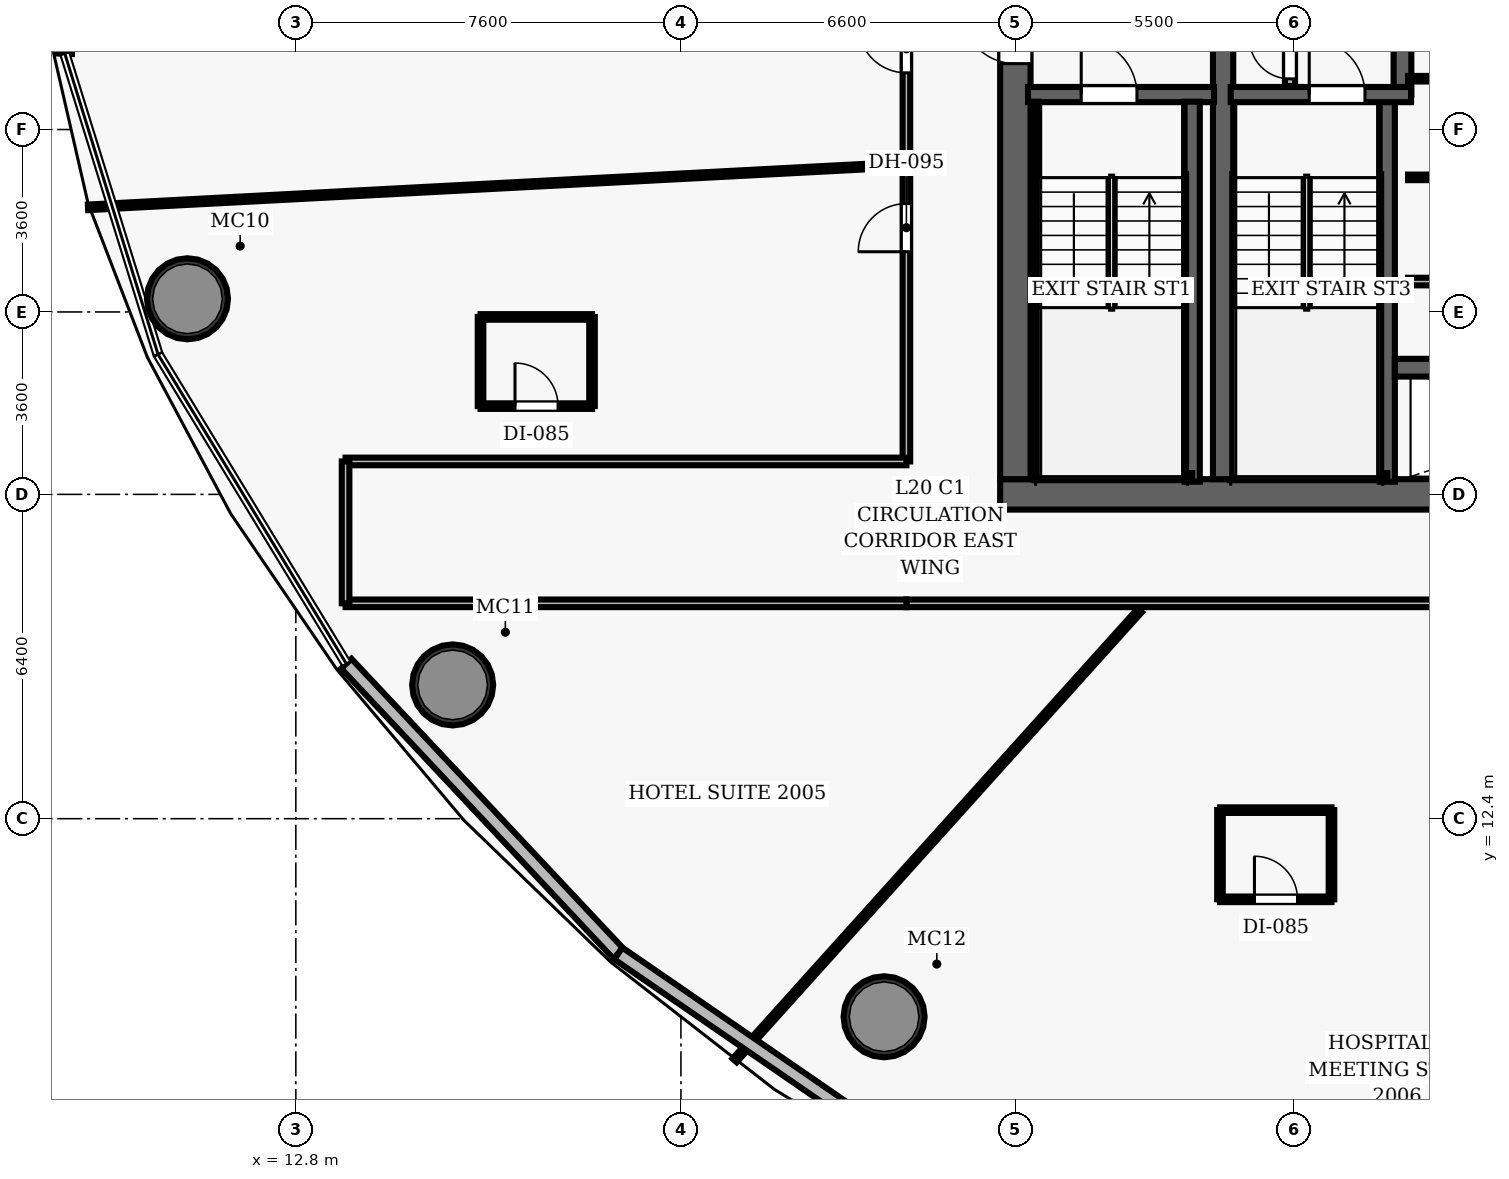
"""IFC4 building model, lengths in metres.
Left out: names, types, materials, properties, quantities, classifications, styles, units other than length and angle.
Written with IfcOpenShell. Run it as: python <this file> out.ifc"""

import sys

from ifc_helpers import new_model, si_unit, direction, frame, frame_2d, origin, origin_2d, place, context, subcontext, project, spatial, rectangle, hollow_circle, extrude, element, fill, save


model = new_model("IFC4")
c1 = context("Model", 3, precision=1e-05, world=origin(), true_north=direction((0.0, 1.0)))
c2 = subcontext(c1, "Body", "Model", "MODEL_VIEW")
j1 = project(units=[si_unit("LENGTHUNIT", "METRE"), si_unit("PLANEANGLEUNIT", "RADIAN")], contexts=[c1])
p1 = place(None, origin())
s1 = spatial("IfcSite", under=j1, at=p1, CompositionType="ELEMENT")
p2 = place(p1, origin())
s2 = spatial("IfcBuilding", under=s1, at=p2, CompositionType="ELEMENT")
p3 = place(p2, frame((0.0, 0.0, 86.9)))
s3 = spatial("IfcBuildingStorey", under=s2, at=p3, CompositionType="ELEMENT", Elevation=86.9)
p4 = place(p3, frame((26.7, 18.8, 0.0), z_axis=(0.0, 0.0, 1.0), x_axis=(1.0, 0.0, 0.0)))
e1 = element("IfcWall", 1, at=p4, inside=s3, PredefinedType="SHEAR", context=c2, shape_type="SweptSolid", body=[
    extrude(rectangle(XDim=22.6, YDim=0.6, at=frame_2d((11.3, 0.0))), origin(), (0.0, 0.0, 1.0), 3.5),
])
p5 = place(p4, frame((14.52, 0.0, 0.0)))
e2 = element("IfcOpeningElement", 2, at=p5, cuts=e1, PredefinedType="OPENING", context=c2, shape_type="SweptSolid", body=[
    extrude(rectangle(XDim=1.05, YDim=2.15, at=frame_2d((0.525, 1.075))), frame((0.0, 0.31, 0.0), z_axis=(0.0, -1.0, 0.0), x_axis=(1.0, 0.0, 0.0)), (0.0, 0.0, 1.0), 0.62),
])
p6 = place(p3, frame((27.0, 19.1, 0.0), z_axis=(0.0, 0.0, 1.0), x_axis=(0.0, 1.0, 0.0)))
e3 = element("IfcWall", 3, at=p6, inside=s3, PredefinedType="SHEAR", context=c2, shape_type="SweptSolid", body=[
    extrude(rectangle(XDim=13.8, YDim=0.6, at=frame_2d((6.9, 0.0))), origin(), (0.0, 0.0, 1.0), 3.5),
])
p7 = place(p6, frame((8.2, 0.0, 0.0)))
e4 = element("IfcOpeningElement", 4, at=p7, cuts=e3, PredefinedType="OPENING", context=c2, shape_type="SweptSolid", body=[
    extrude(rectangle(XDim=1.05, YDim=2.15, at=frame_2d((0.525, 1.075))), frame((0.0, 0.31, 0.0), z_axis=(0.0, -1.0, 0.0), x_axis=(1.0, 0.0, 0.0)), (0.0, 0.0, 1.0), 0.62),
])
p8 = place(p3, frame((31.1, 19.1, 0.0), z_axis=(0.0, 0.0, 1.0), x_axis=(0.0, 1.0, 0.0)))
e5 = element("IfcWall", 5, at=p8, inside=s3, PredefinedType="SHEAR", context=c2, shape_type="SweptSolid", body=[
    extrude(rectangle(XDim=13.8, YDim=0.4, at=frame_2d((6.9, 0.0))), origin(), (0.0, 0.0, 1.0), 3.5),
])
for number, where, z_axis, x_axis in (
    (6, (10.661, 22.66, 0.0), (0.0, 0.0, 1.0), (1.0, 0.0, 0.0)),
    (7, (15.895, 15.04, 0.0), (0.0, 0.0, 1.0), (1.0, 0.0, 0.0)),
    (8, (24.41, 8.491, 0.0), (0.0, 0.0, 1.0), (1.0, 0.0, 0.0)),
):
    element("IfcColumn", number, at=place(p3, frame(where, z_axis=z_axis, x_axis=x_axis)), inside=s3, PredefinedType="COLUMN", context=c2, shape_type="SweptSolid", body=[
        extrude(hollow_circle(Radius=0.8, WallThickness=0.06, at=origin_2d()), origin(), (0.0, 0.0, 1.0), 3.5),
    ])
p9 = place(p3, frame((27.25, 26.69, 0.0), z_axis=(0.0, 0.0, 1.0), x_axis=(1.0, 0.0, 0.0)))
e9 = element("IfcWall", 9, at=p9, inside=s3, PredefinedType="SHEAR", context=c2, shape_type="SweptSolid", body=[
    extrude(rectangle(XDim=3.67, YDim=0.3, at=frame_2d((1.835, 0.0))), origin(), (0.0, 0.0, 1.0), 3.5),
])
p10 = place(p9, frame((1.05, 0.0, 0.0)))
e10 = element("IfcOpeningElement", 10, at=p10, cuts=e9, PredefinedType="OPENING", context=c2, shape_type="SweptSolid", body=[
    extrude(rectangle(XDim=1.1, YDim=2.15, at=frame_2d((0.55, 1.075))), frame((0.0, 0.16, 0.0), z_axis=(0.0, -1.0, 0.0), x_axis=(1.0, 0.0, 0.0)), (0.0, 0.0, 1.0), 0.32),
])
p11 = place(p3, frame((30.49, 19.05, 0.0), z_axis=(0.0, 0.0, 1.0), x_axis=(0.0, 1.0, 0.0)))
e11 = element("IfcWall", 11, at=p11, inside=s3, PredefinedType="SHEAR", context=c2, shape_type="SweptSolid", body=[
    extrude(rectangle(XDim=7.5, YDim=0.3, at=frame_2d((3.75, 0.0))), origin(), (0.0, 0.0, 1.0), 3.5),
])
p12 = place(p3, frame((27.395, 19.1, 0.0), z_axis=(0.0, 0.0, 1.0), x_axis=(0.0, 1.0, 0.0)))
e12 = element("IfcWall", 12, at=p12, inside=s3, PredefinedType="SHEAR", context=c2, shape_type="SweptSolid", body=[
    extrude(rectangle(XDim=7.45, YDim=0.12, at=frame_2d((3.725, 0.0))), origin(), (0.0, 0.0, 1.0), 3.5),
])
p13 = place(p3, frame((27.395, 19.16, 0.0), z_axis=(0.0, 0.0, 1.0), x_axis=(1.0, 0.0, 0.0)))
e13 = element("IfcWall", 13, at=p13, inside=s3, PredefinedType="SHEAR", context=c2, shape_type="SweptSolid", body=[
    extrude(rectangle(XDim=3.095, YDim=0.12, at=frame_2d((1.547, 0.0))), origin(), (0.0, 0.0, 1.0), 3.5),
])
p14 = place(p3, frame((34.34, 19.05, 0.0), z_axis=(0.0, 0.0, 1.0), x_axis=(0.0, 1.0, 0.0)))
e14 = element("IfcWall", 14, at=p14, inside=s3, PredefinedType="SHEAR", context=c2, shape_type="SweptSolid", body=[
    extrude(rectangle(XDim=7.5, YDim=0.3, at=frame_2d((3.75, 0.0))), origin(), (0.0, 0.0, 1.0), 3.5),
])
p15 = place(p3, frame((34.64, 26.69, 0.0), z_axis=(0.0, 0.0, 1.0), x_axis=(0.0, 1.0, 0.0)))
e15 = element("IfcWall", 15, at=p15, inside=s3, PredefinedType="SHEAR", context=c2, shape_type="SweptSolid", body=[
    extrude(rectangle(XDim=6.26, YDim=0.35, at=frame_2d((3.13, 0.0))), origin(), (0.0, 0.0, 1.0), 3.5),
])
p16 = place(p3, frame((31.25, 26.69, 0.0), z_axis=(0.0, 0.0, 1.0), x_axis=(1.0, 0.0, 0.0)))
e16 = element("IfcWall", 16, at=p16, inside=s3, PredefinedType="SHEAR", context=c2, shape_type="SweptSolid", body=[
    extrude(rectangle(XDim=3.56, YDim=0.3, at=frame_2d((1.78, 0.0))), origin(), (0.0, 0.0, 1.0), 3.5),
])
p17 = place(p16, frame((1.55, 0.0, 0.0)))
e17 = element("IfcOpeningElement", 17, at=p17, cuts=e16, PredefinedType="OPENING", context=c2, shape_type="SweptSolid", body=[
    extrude(rectangle(XDim=1.1, YDim=2.15, at=frame_2d((0.55, 1.075))), frame((0.0, 0.16, 0.0), z_axis=(0.0, -1.0, 0.0), x_axis=(1.0, 0.0, 0.0)), (0.0, 0.0, 1.0), 0.32),
])
p18 = place(p3, frame((31.3, 19.16, 0.0), z_axis=(0.0, 0.0, 1.0), x_axis=(1.0, 0.0, 0.0)))
e18 = element("IfcWall", 18, at=p18, inside=s3, PredefinedType="SHEAR", context=c2, shape_type="SweptSolid", body=[
    extrude(rectangle(XDim=3.04, YDim=0.12, at=frame_2d((1.52, 0.0))), origin(), (0.0, 0.0, 1.0), 3.5),
])
p19 = place(p3, frame((32.42, 26.86, 0.0), z_axis=(0.0, 0.0, 1.0), x_axis=(0.0, 1.0, 0.0)))
e19 = element("IfcWall", 19, at=p19, inside=s3, PredefinedType="PARTITIONING", context=c2, shape_type="SweptSolid", body=[
    extrude(rectangle(XDim=2.04, YDim=0.2, at=frame_2d((1.02, 0.0))), origin(), (0.0, 0.0, 1.0), 2.6),
])
p20 = place(p19, frame((0.14, 0.0, 0.0)))
e20 = element("IfcOpeningElement", 20, at=p20, cuts=e19, PredefinedType="OPENING", context=c2, shape_type="SweptSolid", body=[
    extrude(rectangle(XDim=0.8, YDim=2.05, at=frame_2d((0.4, 1.025))), frame((0.0, 0.11, 0.0), z_axis=(0.0, -1.0, 0.0), x_axis=(1.0, 0.0, 0.0)), (0.0, 0.0, 1.0), 0.22),
])
p21 = place(p3, frame((34.49, 21.3, 0.0), z_axis=(0.0, 0.0, 1.0), x_axis=(1.0, 0.0, 0.0)))
e21 = element("IfcWall", 21, at=p21, inside=s3, PredefinedType="SHEAR", context=c2, shape_type="SweptSolid", body=[
    extrude(rectangle(XDim=6.68, YDim=0.35, at=frame_2d((3.34, 0.0))), origin(), (0.0, 0.0, 1.0), 2.6),
])
p22 = place(p3, frame((34.75, 23.0, 0.0), z_axis=(0.0, 0.0, 1.0), x_axis=(1.0, 0.0, 0.0)))
e22 = element("IfcWall", 22, at=p22, inside=s3, PredefinedType="PARTITIONING", context=c2, shape_type="SweptSolid", body=[
    extrude(rectangle(XDim=6.25, YDim=0.15, at=frame_2d((3.125, 0.0))), origin(), (0.0, 0.0, 1.0), 2.6),
])
for number, where, z_axis, x_axis in (
    (23, (34.75, 25.056, 0.0), (0.0, 0.0, 1.0), (1.0, 0.0, 0.0)),
    (24, (34.75, 27.003, 0.0), (0.0, 0.0, 1.0), (1.0, 0.0, 0.0)),
):
    element("IfcWall", number, at=place(p3, frame(where, z_axis=z_axis, x_axis=x_axis)), inside=s3, PredefinedType="PARTITIONING", context=c2, shape_type="SweptSolid", body=[
        extrude(rectangle(XDim=6.25, YDim=0.11, at=frame_2d((3.125, 0.0))), origin(), (0.0, 0.0, 1.0), 2.6),
    ])
p23 = place(p3, frame((24.85, 16.65, 0.0), z_axis=(0.0, 0.0, 1.0), x_axis=(1.0, 0.0, 0.0)))
e25 = element("IfcWall", 25, at=p23, inside=s3, PredefinedType="PARTITIONING", context=c2, shape_type="SweptSolid", body=[
    extrude(rectangle(XDim=23.5, YDim=0.15, at=frame_2d((11.75, 0.0))), origin(), (0.0, 0.0, 1.0), 2.6),
])
p24 = place(p23, frame((11.057, 0.0, 0.0)))
e26 = element("IfcOpeningElement", 26, at=p24, cuts=e25, PredefinedType="OPENING", context=c2, shape_type="SweptSolid", body=[
    extrude(rectangle(XDim=0.95, YDim=2.15, at=frame_2d((0.475, 1.075))), frame((0.0, 0.085, 0.0), z_axis=(0.0, -1.0, 0.0), x_axis=(1.0, 0.0, 0.0)), (0.0, 0.0, 1.0), 0.17),
])
p25 = place(p23, frame((15.413, 0.0, 0.0)))
e27 = element("IfcOpeningElement", 27, at=p25, cuts=e25, PredefinedType="OPENING", context=c2, shape_type="SweptSolid", body=[
    extrude(rectangle(XDim=0.95, YDim=2.15, at=frame_2d((0.475, 1.075))), frame((0.0, 0.085, 0.0), z_axis=(0.0, -1.0, 0.0), x_axis=(1.0, 0.0, 0.0)), (0.0, 0.0, 1.0), 0.17),
])
p26 = place(p3, frame((24.85, 19.45, 0.0), z_axis=(0.0, 0.0, 1.0), x_axis=(0.0, 1.0, 0.0)))
e28 = element("IfcWall", 28, at=p26, inside=s3, PredefinedType="PARTITIONING", context=c2, shape_type="SweptSolid", body=[
    extrude(rectangle(XDim=15.9, YDim=0.15, at=frame_2d((7.95, 0.0))), origin(), (0.0, 0.0, 1.0), 2.6),
])
p27 = place(p26, frame((7.669, 0.0, 0.0)))
e29 = element("IfcOpeningElement", 29, at=p27, cuts=e28, PredefinedType="OPENING", context=c2, shape_type="SweptSolid", body=[
    extrude(rectangle(XDim=0.95, YDim=2.15, at=frame_2d((0.475, 1.075))), frame((0.0, 0.085, 0.0), z_axis=(0.0, -1.0, 0.0), x_axis=(1.0, 0.0, 0.0)), (0.0, 0.0, 1.0), 0.17),
])
p28 = place(p26, frame((4.138, 0.0, 0.0)))
e30 = element("IfcOpeningElement", 30, at=p28, cuts=e28, PredefinedType="OPENING", context=c2, shape_type="SweptSolid", body=[
    extrude(rectangle(XDim=0.95, YDim=2.15, at=frame_2d((0.475, 1.075))), frame((0.0, 0.085, 0.0), z_axis=(0.0, -1.0, 0.0), x_axis=(1.0, 0.0, 0.0)), (0.0, 0.0, 1.0), 0.17),
])
for number, where, z_axis, x_axis in (
    (31, (13.781, 19.45, 0.0), (0.0, 0.0, 1.0), (1.0, 0.0, 0.0)),
    (32, (13.781, 16.65, 0.0), (0.0, 0.0, 1.0), (1.0, 0.0, 0.0)),
):
    element("IfcWall", number, at=place(p3, frame(where, z_axis=z_axis, x_axis=x_axis)), inside=s3, PredefinedType="PARTITIONING", context=c2, shape_type="SweptSolid", body=[
        extrude(rectangle(XDim=11.069, YDim=0.15, at=frame_2d((5.534, 0.0))), origin(), (0.0, 0.0, 1.0), 2.6),
    ])
p29 = place(p3, frame((13.781, 16.65, 0.0), z_axis=(0.0, 0.0, 1.0), x_axis=(0.0, 1.0, 0.0)))
e33 = element("IfcWall", 33, at=p29, inside=s3, PredefinedType="PARTITIONING", context=c2, shape_type="SweptSolid", body=[
    extrude(rectangle(XDim=2.8, YDim=0.15, at=frame_2d((1.4, 0.0))), origin(), (0.0, 0.0, 1.0), 2.6),
])
p30 = place(p3, frame((24.71, 25.303, 0.0), z_axis=(0.0, 0.0, 1.0), x_axis=(-0.998629623722, -0.052334258611, 0.0)))
e34 = element("IfcWall", 34, at=p30, inside=s3, PredefinedType="PARTITIONING", context=c2, shape_type="SweptSolid", body=[
    extrude(rectangle(XDim=16.034, YDim=0.11, at=frame_2d((8.017, 0.0))), origin(), (0.0, 0.0, 1.0), 2.6),
])
p31 = place(p3, frame((29.455, 16.51, 0.0), z_axis=(0.0, 0.0, 1.0), x_axis=(-0.669127258554, -0.743147839841, 0.0)))
e35 = element("IfcWall", 35, at=p31, inside=s3, PredefinedType="PARTITIONING", context=c2, shape_type="SweptSolid", body=[
    extrude(rectangle(XDim=11.95, YDim=0.11, at=frame_2d((5.975, 0.0))), origin(), (0.0, 0.0, 1.0), 2.6),
])
p32 = place(p3, frame((16.445, 20.542, 0.0), z_axis=(0.0, 0.0, 1.0), x_axis=(1.0, 0.0, 0.0)))
e36 = element("IfcWall", 36, at=p32, inside=s3, PredefinedType="PARTITIONING", context=c2, shape_type="SweptSolid", body=[
    extrude(rectangle(XDim=2.2, YDim=0.11, at=frame_2d((1.1, 0.0))), origin(), (0.0, 0.0, 1.0), 2.6),
])
p33 = place(p32, frame((0.68, 0.0, 0.0)))
e37 = element("IfcOpeningElement", 37, at=p33, cuts=e36, PredefinedType="OPENING", context=c2, shape_type="SweptSolid", body=[
    extrude(rectangle(XDim=0.85, YDim=2.1, at=frame_2d((0.425, 1.05))), frame((0.0, 0.065, 0.0), z_axis=(0.0, -1.0, 0.0), x_axis=(1.0, 0.0, 0.0)), (0.0, 0.0, 1.0), 0.13),
])
p34 = place(p3, frame((16.445, 22.302, 0.0), z_axis=(0.0, 0.0, 1.0), x_axis=(1.0, 0.0, 0.0)))
e38 = element("IfcWall", 38, at=p34, inside=s3, PredefinedType="PARTITIONING", context=c2, shape_type="SweptSolid", body=[
    extrude(rectangle(XDim=2.2, YDim=0.11, at=frame_2d((1.1, 0.0))), origin(), (0.0, 0.0, 1.0), 2.6),
])
for number, where, z_axis, x_axis in (
    (39, (16.445, 20.542, 0.0), (0.0, 0.0, 1.0), (0.0, 1.0, 0.0)),
    (40, (18.645, 20.542, 0.0), (0.0, 0.0, 1.0), (0.0, 1.0, 0.0)),
):
    element("IfcWall", number, at=place(p3, frame(where, z_axis=z_axis, x_axis=x_axis)), inside=s3, PredefinedType="PARTITIONING", context=c2, shape_type="SweptSolid", body=[
        extrude(rectangle(XDim=1.76, YDim=0.11, at=frame_2d((0.88, 0.0))), origin(), (0.0, 0.0, 1.0), 2.6),
    ])
p35 = place(p3, frame((31.039, 10.809, 0.0), z_axis=(0.0, 0.0, 1.0), x_axis=(1.0, 0.0, 0.0)))
e41 = element("IfcWall", 41, at=p35, inside=s3, PredefinedType="PARTITIONING", context=c2, shape_type="SweptSolid", body=[
    extrude(rectangle(XDim=2.2, YDim=0.11, at=frame_2d((1.1, 0.0))), origin(), (0.0, 0.0, 1.0), 2.6),
])
p36 = place(p35, frame((0.68, 0.0, 0.0)))
e42 = element("IfcOpeningElement", 42, at=p36, cuts=e41, PredefinedType="OPENING", context=c2, shape_type="SweptSolid", body=[
    extrude(rectangle(XDim=0.85, YDim=2.1, at=frame_2d((0.425, 1.05))), frame((0.0, 0.065, 0.0), z_axis=(0.0, -1.0, 0.0), x_axis=(1.0, 0.0, 0.0)), (0.0, 0.0, 1.0), 0.13),
])
p37 = place(p3, frame((31.039, 12.569, 0.0), z_axis=(0.0, 0.0, 1.0), x_axis=(1.0, 0.0, 0.0)))
e43 = element("IfcWall", 43, at=p37, inside=s3, PredefinedType="PARTITIONING", context=c2, shape_type="SweptSolid", body=[
    extrude(rectangle(XDim=2.2, YDim=0.11, at=frame_2d((1.1, 0.0))), origin(), (0.0, 0.0, 1.0), 2.6),
])
for number, where, z_axis, x_axis in (
    (44, (31.039, 10.809, 0.0), (0.0, 0.0, 1.0), (0.0, 1.0, 0.0)),
    (45, (33.239, 10.809, 0.0), (0.0, 0.0, 1.0), (0.0, 1.0, 0.0)),
):
    element("IfcWall", number, at=place(p3, frame(where, z_axis=z_axis, x_axis=x_axis)), inside=s3, PredefinedType="PARTITIONING", context=c2, shape_type="SweptSolid", body=[
        extrude(rectangle(XDim=1.76, YDim=0.11, at=frame_2d((0.88, 0.0))), origin(), (0.0, 0.0, 1.0), 2.6),
    ])
p38 = place(p3, frame((8.242, 27.495, 0.0), z_axis=(0.0, 0.0, 1.0), x_axis=(0.035127613865, 0.999382834926, 0.0)))
e46 = element("IfcWall", 46, at=p38, inside=s3, PredefinedType="SOLIDWALL", context=c2, shape_type="SweptSolid", body=[
    extrude(rectangle(XDim=5.498, YDim=0.28, at=frame_2d((2.749, 0.0))), origin(), (0.0, 0.0, 1.0), 3.25),
])
p39 = place(p3, frame((19.164, 9.74, 0.0), z_axis=(0.0, 0.0, 1.0), x_axis=(-0.684312676724, 0.729188700183, 0.0)))
e47 = element("IfcWall", 47, at=p39, inside=s3, PredefinedType="SOLIDWALL", context=c2, shape_type="SweptSolid", body=[
    extrude(rectangle(XDim=7.845, YDim=0.28, at=frame_2d((3.922, 0.0))), origin(), (0.0, 0.0, 1.0), 3.25),
])
p40 = place(p3, frame((25.896, 5.109, 0.0), z_axis=(0.0, 0.0, 1.0), x_axis=(-0.823880602335, 0.566763401338, 0.0)))
e48 = element("IfcWall", 48, at=p40, inside=s3, PredefinedType="SOLIDWALL", context=c2, shape_type="SweptSolid", body=[
    extrude(rectangle(XDim=8.171, YDim=0.28, at=frame_2d((4.085, 0.0))), origin(), (0.0, 0.0, 1.0), 3.25),
])
p41 = place(p10, origin())
e49 = element("IfcDoor", 49, at=p41, inside=s3, OperationType="SINGLE_SWING_LEFT", PredefinedType="DOOR", context=c2, shape_type="SweptSolid", body=[
    extrude(rectangle(XDim=1.1, YDim=2.15, at=frame_2d((0.55, 1.075))), frame((0.0, 0.025, 0.0), z_axis=(0.0, -1.0, 0.0), x_axis=(1.0, 0.0, 0.0)), (0.0, 0.0, 1.0), 0.05),
])
fill(e10, e49)
p42 = place(p7, origin())
e50 = element("IfcDoor", 50, at=p42, inside=s3, OperationType="SINGLE_SWING_RIGHT", PredefinedType="DOOR", context=c2, shape_type="SweptSolid", body=[
    extrude(rectangle(XDim=1.05, YDim=2.15, at=frame_2d((0.525, 1.075))), frame((0.0, 0.025, 0.0), z_axis=(0.0, -1.0, 0.0), x_axis=(1.0, 0.0, 0.0)), (0.0, 0.0, 1.0), 0.05),
])
fill(e4, e50)
p43 = place(p17, origin())
e51 = element("IfcDoor", 51, at=p43, inside=s3, OperationType="SINGLE_SWING_LEFT", PredefinedType="DOOR", context=c2, shape_type="SweptSolid", body=[
    extrude(rectangle(XDim=1.1, YDim=2.15, at=frame_2d((0.55, 1.075))), frame((0.0, 0.025, 0.0), z_axis=(0.0, -1.0, 0.0), x_axis=(1.0, 0.0, 0.0)), (0.0, 0.0, 1.0), 0.05),
])
fill(e17, e51)
p44 = place(p20, origin())
e52 = element("IfcDoor", 52, at=p44, inside=s3, OperationType="SINGLE_SWING_RIGHT", PredefinedType="DOOR", context=c2, shape_type="SweptSolid", body=[
    extrude(rectangle(XDim=0.8, YDim=2.05, at=frame_2d((0.4, 1.025))), frame((0.0, 0.025, 0.0), z_axis=(0.0, -1.0, 0.0), x_axis=(1.0, 0.0, 0.0)), (0.0, 0.0, 1.0), 0.05),
])
fill(e20, e52)
p45 = place(p27, origin())
e53 = element("IfcDoor", 53, at=p45, inside=s3, OperationType="SINGLE_SWING_RIGHT", PredefinedType="DOOR", context=c2, shape_type="SweptSolid", body=[
    extrude(rectangle(XDim=0.95, YDim=2.15, at=frame_2d((0.475, 1.075))), frame((0.0, 0.025, 0.0), z_axis=(0.0, -1.0, 0.0), x_axis=(1.0, 0.0, 0.0)), (0.0, 0.0, 1.0), 0.05),
])
fill(e29, e53)
p46 = place(p28, origin())
e54 = element("IfcDoor", 54, at=p46, inside=s3, OperationType="SINGLE_SWING_LEFT", PredefinedType="DOOR", context=c2, shape_type="SweptSolid", body=[
    extrude(rectangle(XDim=0.95, YDim=2.15, at=frame_2d((0.475, 1.075))), frame((0.0, 0.025, 0.0), z_axis=(0.0, -1.0, 0.0), x_axis=(1.0, 0.0, 0.0)), (0.0, 0.0, 1.0), 0.05),
])
fill(e30, e54)
p47 = place(p33, origin())
e55 = element("IfcDoor", 55, at=p47, inside=s3, OperationType="SINGLE_SWING_LEFT", PredefinedType="DOOR", context=c2, shape_type="SweptSolid", body=[
    extrude(rectangle(XDim=0.85, YDim=2.1, at=frame_2d((0.425, 1.05))), frame((0.0, 0.025, 0.0), z_axis=(0.0, -1.0, 0.0), x_axis=(1.0, 0.0, 0.0)), (0.0, 0.0, 1.0), 0.05),
])
fill(e37, e55)
p48 = place(p36, origin())
e56 = element("IfcDoor", 56, at=p48, inside=s3, OperationType="SINGLE_SWING_LEFT", PredefinedType="DOOR", context=c2, shape_type="SweptSolid", body=[
    extrude(rectangle(XDim=0.85, YDim=2.1, at=frame_2d((0.425, 1.05))), frame((0.0, 0.025, 0.0), z_axis=(0.0, -1.0, 0.0), x_axis=(1.0, 0.0, 0.0)), (0.0, 0.0, 1.0), 0.05),
])
fill(e42, e56)
save(model, sys.argv[1])
